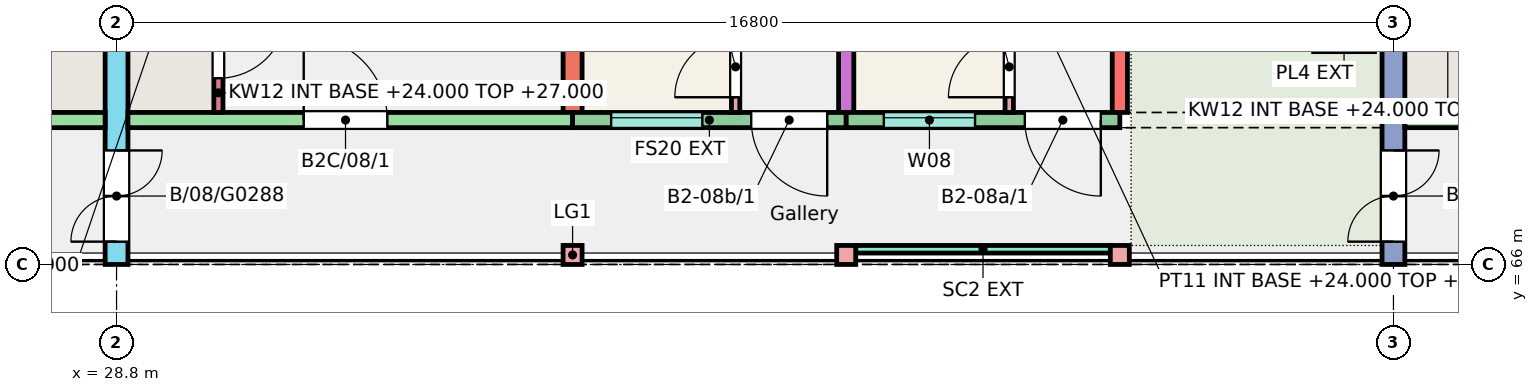
"""IFC4 building model, lengths in metres.
Left out: names, types, materials, properties, quantities, classifications, styles, units other than length and angle.
Written with IfcOpenShell. Run it as: python <this file> out.ifc"""

import sys

from ifc_helpers import new_model, si_unit, direction, frame, frame_2d, origin, origin_2d, place, context, subcontext, project, spatial, rectangle, extrude, element, fill, save


model = new_model("IFC4")
c1 = context("Model", 3, precision=1e-05, world=origin(), true_north=direction((0.0, 1.0)))
c2 = subcontext(c1, "Body", "Model", "MODEL_VIEW")
j1 = project(units=[si_unit("LENGTHUNIT", "METRE"), si_unit("PLANEANGLEUNIT", "RADIAN")], contexts=[c1])
p1 = place(None, origin())
s1 = spatial("IfcSite", under=j1, at=p1, CompositionType="ELEMENT")
p2 = place(p1, origin())
s2 = spatial("IfcBuilding", under=s1, at=p2, CompositionType="ELEMENT")
p3 = place(p2, frame((0.0, 0.0, 24.0)))
s3 = spatial("IfcBuildingStorey", under=s2, at=p3, CompositionType="ELEMENT", Elevation=24.0)
p4 = place(p3, frame((28.8, 66.0, 0.0), z_axis=(0.0, 0.0, 1.0), x_axis=(0.0, 1.0, 0.0)))
e1 = element("IfcWall", 1, at=p4, inside=s3, PredefinedType="SHEAR", context=c2, shape_type="SweptSolid", body=[
    extrude(rectangle(XDim=11.0, YDim=0.3, at=frame_2d((5.5, 0.0))), origin(), (0.0, 0.0, 1.0), 3.0),
])
p5 = place(p4, frame((0.3, 0.0, 0.0)))
e2 = element("IfcOpeningElement", 2, at=p5, cuts=e1, PredefinedType="OPENING", context=c2, shape_type="SweptSolid", body=[
    extrude(rectangle(XDim=1.2, YDim=2.1, at=frame_2d((0.6, 1.05))), frame((0.0, 0.16, 0.0), z_axis=(0.0, -1.0, 0.0), x_axis=(1.0, 0.0, 0.0)), (0.0, 0.0, 1.0), 0.32),
])
p6 = place(p3, frame((34.8, 68.0, 0.0), z_axis=(0.0, 0.0, 1.0), x_axis=(0.0, 1.0, 0.0)))
e3 = element("IfcWall", 3, at=p6, inside=s3, PredefinedType="SHEAR", context=c2, shape_type="SweptSolid", body=[
    extrude(rectangle(XDim=9.0, YDim=0.25, at=frame_2d((4.5, 0.0))), origin(), (0.0, 0.0, 1.0), 3.0),
])
p7 = place(p3, frame((38.4, 68.0, 0.0), z_axis=(0.0, 0.0, 1.0), x_axis=(0.0, 1.0, 0.0)))
e4 = element("IfcWall", 4, at=p7, inside=s3, PredefinedType="SHEAR", context=c2, shape_type="SweptSolid", body=[
    extrude(rectangle(XDim=9.0, YDim=0.2, at=frame_2d((4.5, 0.0))), origin(), (0.0, 0.0, 1.0), 3.0),
])
p8 = place(p3, frame((42.0, 68.0, 0.0), z_axis=(0.0, 0.0, 1.0), x_axis=(0.0, 1.0, 0.0)))
e5 = element("IfcWall", 5, at=p8, inside=s3, PredefinedType="SHEAR", context=c2, shape_type="SweptSolid", body=[
    extrude(rectangle(XDim=9.0, YDim=0.2, at=frame_2d((4.5, 0.0))), origin(), (0.0, 0.0, 1.0), 3.0),
])
p9 = place(p8, frame((7.552, 0.0, 0.9)))
e6 = element("IfcOpeningElement", 6, at=p9, cuts=e5, PredefinedType="OPENING", context=c2, shape_type="SweptSolid", body=[
    extrude(rectangle(XDim=1.2, YDim=1.5, at=frame_2d((0.6, 0.75))), frame((0.0, 0.11, 0.0), z_axis=(0.0, -1.0, 0.0), x_axis=(1.0, 0.0, 0.0)), (0.0, 0.0, 1.0), 0.22),
])
p10 = place(p8, frame((6.205, 0.0, 0.0)))
e7 = element("IfcOpeningElement", 7, at=p10, cuts=e5, PredefinedType="OPENING", context=c2, shape_type="SweptSolid", body=[
    extrude(rectangle(XDim=1.0, YDim=2.1, at=frame_2d((0.5, 1.05))), frame((0.0, 0.11, 0.0), z_axis=(0.0, -1.0, 0.0), x_axis=(1.0, 0.0, 0.0)), (0.0, 0.0, 1.0), 0.22),
])
p11 = place(p3, frame((45.6, 66.0, 0.0), z_axis=(0.0, 0.0, 1.0), x_axis=(0.0, 1.0, 0.0)))
e8 = element("IfcWall", 8, at=p11, inside=s3, PredefinedType="SHEAR", context=c2, shape_type="SweptSolid", body=[
    extrude(rectangle(XDim=11.0, YDim=0.3, at=frame_2d((5.5, 0.0))), origin(), (0.0, 0.0, 1.0), 3.0),
])
p12 = place(p11, frame((0.3, 0.0, 0.0)))
e9 = element("IfcOpeningElement", 9, at=p12, cuts=e8, PredefinedType="OPENING", context=c2, shape_type="SweptSolid", body=[
    extrude(rectangle(XDim=1.2, YDim=2.1, at=frame_2d((0.6, 1.05))), frame((0.0, 0.16, 0.0), z_axis=(0.0, -1.0, 0.0), x_axis=(1.0, 0.0, 0.0)), (0.0, 0.0, 1.0), 0.32),
])
p13 = place(p3, frame((22.8, 67.9, 0.0), z_axis=(0.0, 0.0, 1.0), x_axis=(1.0, 0.0, 0.0)))
e10 = element("IfcWall", 10, at=p13, inside=s3, PredefinedType="SHEAR", context=c2, shape_type="SweptSolid", body=[
    extrude(rectangle(XDim=5.85, YDim=0.2, at=frame_2d((2.925, 0.0))), origin(), (0.0, 0.0, 1.0), 2.75),
])
p14 = place(p13, frame((2.438, 0.0, 0.0)))
e11 = element("IfcOpeningElement", 11, at=p14, cuts=e10, PredefinedType="OPENING", context=c2, shape_type="SweptSolid", body=[
    extrude(rectangle(XDim=1.1, YDim=2.1, at=frame_2d((0.55, 1.05))), frame((0.0, 0.11, 0.0), z_axis=(0.0, -1.0, 0.0), x_axis=(1.0, 0.0, 0.0)), (0.0, 0.0, 1.0), 0.22),
])
p15 = place(p3, frame((28.95, 67.9, 0.0), z_axis=(0.0, 0.0, 1.0), x_axis=(1.0, 0.0, 0.0)))
e12 = element("IfcWall", 12, at=p15, inside=s3, PredefinedType="SHEAR", context=c2, shape_type="SweptSolid", body=[
    extrude(rectangle(XDim=5.85, YDim=0.2, at=frame_2d((2.925, 0.0))), origin(), (0.0, 0.0, 1.0), 3.0),
])
p16 = place(p15, frame((2.312, 0.0, 0.0)))
e13 = element("IfcOpeningElement", 13, at=p16, cuts=e12, PredefinedType="OPENING", context=c2, shape_type="SweptSolid", body=[
    extrude(rectangle(XDim=1.1, YDim=2.1, at=frame_2d((0.55, 1.05))), frame((0.0, 0.11, 0.0), z_axis=(0.0, -1.0, 0.0), x_axis=(1.0, 0.0, 0.0)), (0.0, 0.0, 1.0), 0.22),
])
p17 = place(p3, frame((30.14, 68.0, 0.0), z_axis=(0.0, 0.0, 1.0), x_axis=(0.0, 1.0, 0.0)))
e14 = element("IfcWall", 14, at=p17, inside=s3, PredefinedType="SHEAR", context=c2, shape_type="SweptSolid", body=[
    extrude(rectangle(XDim=1.72, YDim=0.12, at=frame_2d((0.86, 0.0))), origin(), (0.0, 0.0, 1.0), 3.0),
])
p18 = place(p17, frame((0.45, 0.0, 0.0)))
e15 = element("IfcOpeningElement", 15, at=p18, cuts=e14, PredefinedType="OPENING", context=c2, shape_type="SweptSolid", body=[
    extrude(rectangle(XDim=0.9, YDim=2.1, at=frame_2d((0.45, 1.05))), frame((0.0, 0.07, 0.0), z_axis=(0.0, -1.0, 0.0), x_axis=(1.0, 0.0, 0.0)), (0.0, 0.0, 1.0), 0.14),
])
p19 = place(p3, frame((34.8, 67.9, 0.0), z_axis=(0.0, 0.0, 1.0), x_axis=(1.0, 0.0, 0.0)))
e16 = element("IfcWall", 16, at=p19, inside=s3, PredefinedType="SOLIDWALL", context=c2, shape_type="SweptSolid", body=[
    extrude(rectangle(XDim=3.6, YDim=0.2, at=frame_2d((1.8, 0.0))), origin(), (0.0, 0.0, 1.0), 3.0),
])
p20 = place(p19, frame((0.508, 0.0, 1.1)))
e17 = element("IfcOpeningElement", 17, at=p20, cuts=e16, PredefinedType="OPENING", context=c2, shape_type="SweptSolid", body=[
    extrude(rectangle(XDim=1.2, YDim=1.3, at=frame_2d((0.6, 0.65))), frame((0.0, 0.11, 0.0), z_axis=(0.0, -1.0, 0.0), x_axis=(1.0, 0.0, 0.0)), (0.0, 0.0, 1.0), 0.22),
])
p21 = place(p19, frame((2.35, 0.0, 0.0)))
e18 = element("IfcOpeningElement", 18, at=p21, cuts=e16, PredefinedType="OPENING", context=c2, shape_type="SweptSolid", body=[
    extrude(rectangle(XDim=1.0, YDim=2.1, at=frame_2d((0.5, 1.05))), frame((0.0, 0.11, 0.0), z_axis=(0.0, -1.0, 0.0), x_axis=(1.0, 0.0, 0.0)), (0.0, 0.0, 1.0), 0.22),
])
p22 = place(p3, frame((38.4, 67.9, 0.0), z_axis=(0.0, 0.0, 1.0), x_axis=(1.0, 0.0, 0.0)))
e19 = element("IfcWall", 19, at=p22, inside=s3, PredefinedType="SOLIDWALL", context=c2, shape_type="SweptSolid", body=[
    extrude(rectangle(XDim=3.6, YDim=0.2, at=frame_2d((1.8, 0.0))), origin(), (0.0, 0.0, 1.0), 3.0),
])
p23 = place(p22, frame((0.495, 0.0, 1.1)))
e20 = element("IfcOpeningElement", 20, at=p23, cuts=e19, PredefinedType="OPENING", context=c2, shape_type="SweptSolid", body=[
    extrude(rectangle(XDim=1.2, YDim=1.3, at=frame_2d((0.6, 0.65))), frame((0.0, 0.11, 0.0), z_axis=(0.0, -1.0, 0.0), x_axis=(1.0, 0.0, 0.0)), (0.0, 0.0, 1.0), 0.22),
])
p24 = place(p22, frame((2.35, 0.0, 0.0)))
e21 = element("IfcOpeningElement", 21, at=p24, cuts=e19, PredefinedType="OPENING", context=c2, shape_type="SweptSolid", body=[
    extrude(rectangle(XDim=1.0, YDim=2.1, at=frame_2d((0.5, 1.05))), frame((0.0, 0.11, 0.0), z_axis=(0.0, -1.0, 0.0), x_axis=(1.0, 0.0, 0.0)), (0.0, 0.0, 1.0), 0.22),
])
p25 = place(p3, frame((45.75, 67.9, 0.0), z_axis=(0.0, 0.0, 1.0), x_axis=(1.0, 0.0, 0.0)))
e22 = element("IfcWall", 22, at=p25, inside=s3, PredefinedType="SHEAR", context=c2, shape_type="SweptSolid", body=[
    extrude(rectangle(XDim=5.85, YDim=0.2, at=frame_2d((2.925, 0.0))), origin(), (0.0, 0.0, 1.0), 2.75),
])
p26 = place(p25, frame((2.312, 0.0, 0.0)))
e23 = element("IfcOpeningElement", 23, at=p26, cuts=e22, PredefinedType="OPENING", context=c2, shape_type="SweptSolid", body=[
    extrude(rectangle(XDim=1.1, YDim=2.1, at=frame_2d((0.55, 1.05))), frame((0.0, 0.11, 0.0), z_axis=(0.0, -1.0, 0.0), x_axis=(1.0, 0.0, 0.0)), (0.0, 0.0, 1.0), 0.22),
])
for number, where, z_axis, x_axis in (
    (24, (34.8, 66.125, 0.0), (0.0, 0.0, 1.0), (1.0, 0.0, 0.0)),
    (25, (38.4, 66.125, 0.0), (0.0, 0.0, 1.0), (1.0, 0.0, 0.0)),
    (26, (42.0, 66.125, 0.0), (0.0, 0.0, 1.0), (1.0, 0.0, 0.0)),
):
    element("IfcColumn", number, at=place(p3, frame(where, z_axis=z_axis, x_axis=x_axis)), inside=s3, PredefinedType="COLUMN", context=c2, shape_type="SweptSolid", body=[
        extrude(rectangle(XDim=0.25, YDim=0.25, at=origin_2d()), origin(), (0.0, 0.0, 1.0), 3.0),
    ])
p27 = place(p3, frame((44.55, 68.9, 0.01), z_axis=(0.0, 0.0, 1.0), x_axis=(1.0, 0.0, 0.0)))
e27 = element("IfcWall", 27, at=p27, inside=s3, PredefinedType="SOLIDWALL", context=c2, shape_type="SweptSolid", body=[
    extrude(rectangle(XDim=0.8, YDim=0.2, at=frame_2d((0.4, 0.0))), origin(), (0.0, 0.0, 1.0), 0.45),
])
p28 = place(p3, frame((38.525, 66.2, 0.0), z_axis=(0.0, 0.0, 1.0), x_axis=(1.0, 0.0, 0.0)))
e28 = element("IfcWall", 28, at=p28, inside=s3, PredefinedType="SOLIDWALL", context=c2, shape_type="SweptSolid", body=[
    extrude(rectangle(XDim=3.35, YDim=0.1, at=frame_2d((1.675, 0.0))), origin(), (0.0, 0.0, 1.0), 2.45),
])
p29 = place(p3, frame((40.545, 68.0, 0.0), z_axis=(0.0, 0.0, 1.0), x_axis=(0.0, 1.0, 0.0)))
e29 = element("IfcWall", 29, at=p29, inside=s3, PredefinedType="PARTITIONING", context=c2, shape_type="SweptSolid", body=[
    extrude(rectangle(XDim=4.3, YDim=0.11, at=frame_2d((2.15, 0.0))), origin(), (0.0, 0.0, 1.0), 2.75),
])
p30 = place(p29, frame((0.2, 0.0, 0.0)))
e30 = element("IfcOpeningElement", 30, at=p30, cuts=e29, PredefinedType="OPENING", context=c2, shape_type="SweptSolid", body=[
    extrude(rectangle(XDim=0.8, YDim=2.1, at=frame_2d((0.4, 1.05))), frame((0.0, 0.065, 0.0), z_axis=(0.0, -1.0, 0.0), x_axis=(1.0, 0.0, 0.0)), (0.0, 0.0, 1.0), 0.13),
])
p31 = place(p29, frame((3.35, 0.0, 0.0)))
e31 = element("IfcOpeningElement", 31, at=p31, cuts=e29, PredefinedType="OPENING", context=c2, shape_type="SweptSolid", body=[
    extrude(rectangle(XDim=0.8, YDim=2.1, at=frame_2d((0.4, 1.05))), frame((0.0, 0.065, 0.0), z_axis=(0.0, -1.0, 0.0), x_axis=(1.0, 0.0, 0.0)), (0.0, 0.0, 1.0), 0.13),
])
p32 = place(p3, frame((36.945, 68.0, 0.0), z_axis=(0.0, 0.0, 1.0), x_axis=(0.0, 1.0, 0.0)))
e32 = element("IfcWall", 32, at=p32, inside=s3, PredefinedType="PARTITIONING", context=c2, shape_type="SweptSolid", body=[
    extrude(rectangle(XDim=4.3, YDim=0.11, at=frame_2d((2.15, 0.0))), origin(), (0.0, 0.0, 1.0), 2.8),
])
p33 = place(p32, frame((0.2, 0.0, 0.0)))
e33 = element("IfcOpeningElement", 33, at=p33, cuts=e32, PredefinedType="OPENING", context=c2, shape_type="SweptSolid", body=[
    extrude(rectangle(XDim=0.8, YDim=2.1, at=frame_2d((0.4, 1.05))), frame((0.0, 0.065, 0.0), z_axis=(0.0, -1.0, 0.0), x_axis=(1.0, 0.0, 0.0)), (0.0, 0.0, 1.0), 0.13),
])
p34 = place(p32, frame((3.35, 0.0, 0.0)))
e34 = element("IfcOpeningElement", 34, at=p34, cuts=e32, PredefinedType="OPENING", context=c2, shape_type="SweptSolid", body=[
    extrude(rectangle(XDim=0.8, YDim=2.1, at=frame_2d((0.4, 1.05))), frame((0.0, 0.065, 0.0), z_axis=(0.0, -1.0, 0.0), x_axis=(1.0, 0.0, 0.0)), (0.0, 0.0, 1.0), 0.13),
])
p35 = place(p23, origin())
e35 = element("IfcWindow", 35, at=p35, inside=s3, PartitioningType="SINGLE_PANEL", PredefinedType="WINDOW", context=c2, shape_type="SweptSolid", body=[
    extrude(rectangle(XDim=1.2, YDim=1.3, at=frame_2d((0.6, 0.65))), frame((0.0, 0.06, 0.0), z_axis=(0.0, -1.0, 0.0), x_axis=(1.0, 0.0, 0.0)), (0.0, 0.0, 1.0), 0.06),
])
fill(e20, e35)
p36 = place(p20, origin())
e36 = element("IfcWindow", 36, at=p36, inside=s3, PartitioningType="SINGLE_PANEL", PredefinedType="WINDOW", context=c2, shape_type="SweptSolid", body=[
    extrude(rectangle(XDim=1.2, YDim=1.3, at=frame_2d((0.6, 0.65))), frame((0.0, 0.06, 0.0), z_axis=(0.0, -1.0, 0.0), x_axis=(1.0, 0.0, 0.0)), (0.0, 0.0, 1.0), 0.06),
])
fill(e17, e36)
p37 = place(p24, origin())
e37 = element("IfcDoor", 37, at=p37, inside=s3, OperationType="SINGLE_SWING_RIGHT", PredefinedType="DOOR", context=c2, shape_type="SweptSolid", body=[
    extrude(rectangle(XDim=1.0, YDim=2.1, at=frame_2d((0.5, 1.05))), frame((0.0, 0.025, 0.0), z_axis=(0.0, -1.0, 0.0), x_axis=(1.0, 0.0, 0.0)), (0.0, 0.0, 1.0), 0.05),
])
fill(e21, e37)
p38 = place(p30, origin())
e38 = element("IfcDoor", 38, at=p38, inside=s3, OperationType="SINGLE_SWING_LEFT", PredefinedType="DOOR", context=c2, shape_type="SweptSolid", body=[
    extrude(rectangle(XDim=0.8, YDim=2.1, at=frame_2d((0.4, 1.05))), frame((0.0, 0.025, 0.0), z_axis=(0.0, -1.0, 0.0), x_axis=(1.0, 0.0, 0.0)), (0.0, 0.0, 1.0), 0.05),
])
fill(e30, e38)
p39 = place(p21, origin())
e39 = element("IfcDoor", 39, at=p39, inside=s3, OperationType="SINGLE_SWING_RIGHT", PredefinedType="DOOR", context=c2, shape_type="SweptSolid", body=[
    extrude(rectangle(XDim=1.0, YDim=2.1, at=frame_2d((0.5, 1.05))), frame((0.0, 0.025, 0.0), z_axis=(0.0, -1.0, 0.0), x_axis=(1.0, 0.0, 0.0)), (0.0, 0.0, 1.0), 0.05),
])
fill(e18, e39)
p40 = place(p33, origin())
e40 = element("IfcDoor", 40, at=p40, inside=s3, OperationType="SINGLE_SWING_LEFT", PredefinedType="DOOR", context=c2, shape_type="SweptSolid", body=[
    extrude(rectangle(XDim=0.8, YDim=2.1, at=frame_2d((0.4, 1.05))), frame((0.0, 0.025, 0.0), z_axis=(0.0, -1.0, 0.0), x_axis=(1.0, 0.0, 0.0)), (0.0, 0.0, 1.0), 0.05),
])
fill(e33, e40)
p41 = place(p16, origin())
e41 = element("IfcDoor", 41, at=p41, inside=s3, OperationType="SINGLE_SWING_LEFT", PredefinedType="DOOR", context=c2, shape_type="SweptSolid", body=[
    extrude(rectangle(XDim=1.1, YDim=2.1, at=frame_2d((0.55, 1.05))), frame((0.0, 0.025, 0.0), z_axis=(0.0, -1.0, 0.0), x_axis=(1.0, 0.0, 0.0)), (0.0, 0.0, 1.0), 0.05),
])
fill(e13, e41)
p42 = place(p18, origin())
e42 = element("IfcDoor", 42, at=p42, inside=s3, OperationType="SINGLE_SWING_RIGHT", PredefinedType="DOOR", context=c2, shape_type="SweptSolid", body=[
    extrude(rectangle(XDim=0.9, YDim=2.1, at=frame_2d((0.45, 1.05))), frame((0.0, 0.025, 0.0), z_axis=(0.0, -1.0, 0.0), x_axis=(1.0, 0.0, 0.0)), (0.0, 0.0, 1.0), 0.05),
])
fill(e15, e42)
p43 = place(p5, origin())
e43 = element("IfcDoor", 43, at=p43, inside=s3, OperationType="DOUBLE_DOOR_SINGLE_SWING", PredefinedType="DOOR", context=c2, shape_type="SweptSolid", body=[
    extrude(rectangle(XDim=1.2, YDim=2.1, at=frame_2d((0.6, 1.05))), frame((0.0, 0.025, 0.0), z_axis=(0.0, -1.0, 0.0), x_axis=(1.0, 0.0, 0.0)), (0.0, 0.0, 1.0), 0.05),
])
fill(e2, e43)
p44 = place(p12, origin())
e44 = element("IfcDoor", 44, at=p44, inside=s3, OperationType="DOUBLE_DOOR_SINGLE_SWING", PredefinedType="DOOR", context=c2, shape_type="SweptSolid", body=[
    extrude(rectangle(XDim=1.2, YDim=2.1, at=frame_2d((0.6, 1.05))), frame((0.0, 0.025, 0.0), z_axis=(0.0, -1.0, 0.0), x_axis=(1.0, 0.0, 0.0)), (0.0, 0.0, 1.0), 0.05),
])
fill(e9, e44)
save(model, sys.argv[1])
